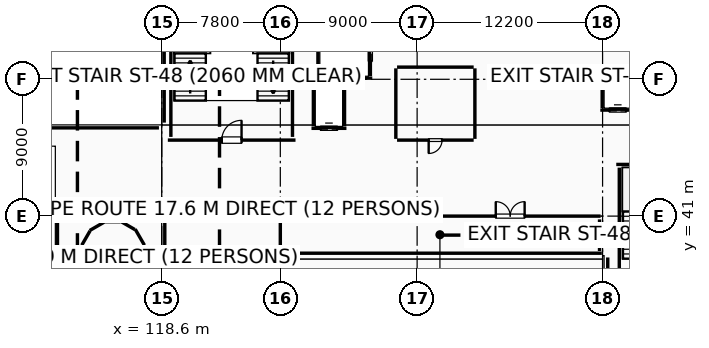
"""IFC4 building model, lengths in metres.
Left out: names, types, materials, properties, quantities, classifications, styles, units other than length and angle.
Written with IfcOpenShell. Run it as: python <this file> out.ifc"""

import sys

from ifc_helpers import new_model, si_unit, direction, frame, frame_2d, origin, origin_2d, place, context, subcontext, project, spatial, rectangle, i_section, extrude, element, fill, save


model = new_model("IFC4")
c1 = context("Model", 3, precision=1e-05, world=origin(), true_north=direction((0.0, 1.0)))
c2 = subcontext(c1, "Body", "Model", "MODEL_VIEW")
j1 = project(units=[si_unit("LENGTHUNIT", "METRE"), si_unit("PLANEANGLEUNIT", "RADIAN")], contexts=[c1])
p1 = place(None, origin())
s1 = spatial("IfcSite", under=j1, at=p1, CompositionType="ELEMENT")
p2 = place(p1, origin())
s2 = spatial("IfcBuilding", under=s1, at=p2, CompositionType="ELEMENT")
p3 = place(p2, frame((0.0, 0.0, 10.2)))
s3 = spatial("IfcBuildingStorey", under=s2, at=p3, CompositionType="ELEMENT", Elevation=10.2)
for number, where, z_axis, x_axis in (
    (1, (118.6, 50.0, 0.0), (0.0, 0.0, 1.0), (1.0, 0.0, 0.0)),
    (2, (126.4, 41.0, 0.0), (0.0, 0.0, 1.0), (1.0, 0.0, 0.0)),
    (3, (135.4, 41.0, 0.0), (0.0, 0.0, 1.0), (1.0, 0.0, 0.0)),
    (4, (135.4, 50.0, 0.0), (0.0, 0.0, 1.0), (1.0, 0.0, 0.0)),
):
    element("IfcColumn", number, at=place(p3, frame(where, z_axis=z_axis, x_axis=x_axis)), inside=s3, PredefinedType="COLUMN", context=c2, shape_type="SweptSolid", body=[
        extrude(rectangle(XDim=0.75, YDim=0.75, at=origin_2d()), origin(), (0.0, 0.0, 1.0), 4.8),
    ])
p4 = place(p3, frame((147.6, 41.0, 0.0), z_axis=(0.0, 0.0, 1.0), x_axis=(1.0, 0.0, 0.0)))
e5 = element("IfcColumn", 5, at=p4, inside=s3, PredefinedType="COLUMN", context=c2, shape_type="SweptSolid", body=[
    extrude(i_section(OverallWidth=0.25, OverallDepth=0.4, WebThickness=0.01, FlangeThickness=0.013, FilletRadius=0.014, at=origin_2d()), origin(), (0.0, 0.0, 1.0), 4.8),
])
for number, where, z_axis, x_axis in (
    (6, (121.72, 51.78, 0.0), (0.0, 0.0, 1.0), (1.0, 0.0, 0.0)),
    (7, (124.68, 51.78, 0.0), (0.0, 0.0, 1.0), (1.0, 0.0, 0.0)),
):
    element("IfcColumn", number, at=place(p3, frame(where, z_axis=z_axis, x_axis=x_axis)), inside=s3, PredefinedType="COLUMN", context=c2, shape_type="SweptSolid", body=[
        extrude(i_section(OverallWidth=0.25, OverallDepth=0.35, WebThickness=0.01, FlangeThickness=0.012, FilletRadius=0.012, at=origin_2d()), origin(), (0.0, 0.0, 1.0), 4.8),
    ])
p5 = place(p3, frame((112.6, 41.0, 0.0), z_axis=(0.0, 0.0, 1.0), x_axis=(1.0, 0.0, 0.0)))
e8 = element("IfcColumn", 8, at=p5, inside=s3, PredefinedType="COLUMN", context=c2, shape_type="SweptSolid", body=[
    extrude(rectangle(XDim=1.2, YDim=1.2, at=origin_2d()), origin(), (0.0, 0.0, 1.0), 4.8),
])
p6 = place(p3, frame((103.129, 46.805, 0.0), z_axis=(0.0, 0.0, 1.0), x_axis=(1.0, 0.0, 0.0)))
e9 = element("IfcWall", 9, at=p6, inside=s3, PredefinedType="STANDARD", context=c2, shape_type="SweptSolid", body=[
    extrude(rectangle(XDim=15.286, YDim=0.35, at=frame_2d((7.643, 0.0))), origin(), (0.0, 0.0, 1.0), 3.725),
])
p7 = place(p3, frame((118.76, 47.15, 0.0), z_axis=(0.0, 0.0, 1.0), x_axis=(0.0, 1.0, 0.0)))
e10 = element("IfcWall", 10, at=p7, inside=s3, PredefinedType="STANDARD", context=c2, shape_type="SweptSolid", body=[
    extrude(rectangle(XDim=2.467, YDim=0.28, at=frame_2d((1.233, 0.0))), origin(), (0.0, 0.0, 1.0), 4.54),
])
p8 = place(p3, frame((118.76, 50.383, 0.0), z_axis=(0.0, 0.0, 1.0), x_axis=(0.0, 1.0, 0.0)))
e11 = element("IfcWall", 11, at=p8, inside=s3, PredefinedType="STANDARD", context=c2, shape_type="SweptSolid", body=[
    extrude(rectangle(XDim=5.234, YDim=0.28, at=frame_2d((2.617, 0.0))), origin(), (0.0, 0.0, 1.0), 3.525),
])
p9 = place(p8, frame((1.717, 0.0, 0.95)))
e12 = element("IfcOpeningElement", 12, at=p9, cuts=e11, PredefinedType="OPENING", context=c2, shape_type="SweptSolid", body=[
    extrude(rectangle(XDim=1.8, YDim=2.1, at=frame_2d((0.9, 1.05))), frame((0.0, 0.15, 0.0), z_axis=(0.0, -1.0, 0.0), x_axis=(1.0, 0.0, 0.0)), (0.0, 0.0, 1.0), 0.3),
])
p10 = place(p3, frame((147.94, 24.12, 0.0), z_axis=(0.0, 0.0, 1.0), x_axis=(0.0, 1.0, 0.0)))
e13 = element("IfcWall", 13, at=p10, inside=s3, PredefinedType="PARAPET", context=c2, shape_type="SweptSolid", body=[
    extrude(rectangle(XDim=14.16, YDim=0.18, at=frame_2d((7.08, 0.0))), origin(), (0.0, 0.0, 1.0), 0.88),
])
p11 = place(p3, frame((147.55, 38.56, 0.0), z_axis=(0.0, 0.0, 1.0), x_axis=(-1.0, 0.0, 0.0)))
e14 = element("IfcWall", 14, at=p11, inside=s3, PredefinedType="STANDARD", context=c2, shape_type="SweptSolid", body=[
    extrude(rectangle(XDim=21.1, YDim=0.28, at=frame_2d((10.55, 0.0))), origin(), (0.0, 0.0, 1.0), 4.54),
])
p12 = place(p3, frame((126.15, 38.26, 0.0), z_axis=(0.0, 0.0, 1.0), x_axis=(0.0, -1.0, 0.0)))
e15 = element("IfcWall", 15, at=p12, inside=s3, PredefinedType="ELEMENTEDWALL", context=c2, shape_type="SweptSolid", body=[
    extrude(rectangle(XDim=5.877, YDim=0.26, at=frame_2d((2.938, 0.0))), origin(), (0.0, 0.0, 1.0), 3.775),
])
p13 = place(p3, frame((119.0, 46.0, 0.0), z_axis=(0.0, 0.0, 1.0), x_axis=(1.0, 0.0, 0.0)))
e16 = element("IfcWall", 16, at=p13, inside=s3, PredefinedType="SHEAR", context=c2, shape_type="SweptSolid", body=[
    extrude(rectangle(XDim=8.4, YDim=0.4, at=frame_2d((4.2, 0.0))), origin(), (0.0, 0.0, 1.0), 4.54),
])
p14 = place(p13, frame((3.55, 0.0, 0.0)))
e17 = element("IfcOpeningElement", 17, at=p14, cuts=e16, PredefinedType="OPENING", context=c2, shape_type="SweptSolid", body=[
    extrude(rectangle(XDim=1.3, YDim=2.15, at=frame_2d((0.65, 1.075))), frame((0.0, 0.21, 0.0), z_axis=(0.0, -1.0, 0.0), x_axis=(1.0, 0.0, 0.0)), (0.0, 0.0, 1.0), 0.42),
])
for number, where, z_axis, x_axis in (
    (18, (127.2, 46.21, 0.0), (0.0, 0.0, 1.0), (0.0, 1.0, 0.0)),
    (19, (119.2, 54.59, 0.0), (0.0, 0.0, 1.0), (0.0, -1.0, 0.0)),
):
    element("IfcWall", number, at=place(p3, frame(where, z_axis=z_axis, x_axis=x_axis)), inside=s3, PredefinedType="SHEAR", context=c2, shape_type="SweptSolid", body=[
        extrude(rectangle(XDim=8.38, YDim=0.4, at=frame_2d((4.19, 0.0))), origin(), (0.0, 0.0, 1.0), 4.54),
    ])
p15 = place(p3, frame((128.45, 46.775, 0.0), z_axis=(0.0, 0.0, 1.0), x_axis=(1.0, 0.0, 0.0)))
e20 = element("IfcWall", 20, at=p15, inside=s3, PredefinedType="STANDARD", context=c2, shape_type="SweptSolid", body=[
    extrude(rectangle(XDim=2.3, YDim=0.25, at=frame_2d((1.15, 0.0))), origin(), (0.0, 0.0, 1.0), 4.53),
])
p16 = place(p15, frame((0.6, 0.0, 0.0)))
e21 = element("IfcOpeningElement", 21, at=p16, cuts=e20, PredefinedType="OPENING", context=c2, shape_type="SweptSolid", body=[
    extrude(rectangle(XDim=1.1, YDim=2.15, at=frame_2d((0.55, 1.075))), frame((0.0, 0.135, 0.0), z_axis=(0.0, -1.0, 0.0), x_axis=(1.0, 0.0, 0.0)), (0.0, 0.0, 1.0), 0.27),
])
p17 = place(p3, frame((130.75, 49.625, 0.0), z_axis=(0.0, 0.0, 1.0), x_axis=(-1.0, 0.0, 0.0)))
e22 = element("IfcWall", 22, at=p17, inside=s3, PredefinedType="STANDARD", context=c2, shape_type="SweptSolid", body=[
    extrude(rectangle(XDim=2.3, YDim=0.25, at=frame_2d((1.15, 0.0))), origin(), (0.0, 0.0, 1.0), 4.53),
])
for number, where, z_axis, x_axis in (
    (23, (130.625, 46.91, 0.0), (0.0, 0.0, 1.0), (0.0, 1.0, 0.0)),
    (24, (128.575, 49.49, 0.0), (0.0, 0.0, 1.0), (0.0, -1.0, 0.0)),
):
    element("IfcWall", number, at=place(p3, frame(where, z_axis=z_axis, x_axis=x_axis)), inside=s3, PredefinedType="STANDARD", context=c2, shape_type="SweptSolid", body=[
        extrude(rectangle(XDim=2.58, YDim=0.25, at=frame_2d((1.29, 0.0))), origin(), (0.0, 0.0, 1.0), 4.53),
    ])
p18 = place(p3, frame((128.75, 50.075, 0.0), z_axis=(0.0, 0.0, 1.0), x_axis=(1.0, 0.0, 0.0)))
e25 = element("IfcWall", 25, at=p18, inside=s3, PredefinedType="STANDARD", context=c2, shape_type="SweptSolid", body=[
    extrude(rectangle(XDim=3.7, YDim=0.25, at=frame_2d((1.85, 0.0))), origin(), (0.0, 0.0, 1.0), 4.53),
])
p19 = place(p3, frame((132.325, 50.21, 0.0), z_axis=(0.0, 0.0, 1.0), x_axis=(0.0, 1.0, 0.0)))
e26 = element("IfcWall", 26, at=p19, inside=s3, PredefinedType="STANDARD", context=c2, shape_type="SweptSolid", body=[
    extrude(rectangle(XDim=4.38, YDim=0.25, at=frame_2d((2.19, 0.0))), origin(), (0.0, 0.0, 1.0), 4.53),
])
p20 = place(p19, frame((0.99, 0.0, 0.0)))
e27 = element("IfcOpeningElement", 27, at=p20, cuts=e26, PredefinedType="OPENING", context=c2, shape_type="SweptSolid", body=[
    extrude(rectangle(XDim=2.4, YDim=2.55, at=frame_2d((1.2, 1.275))), frame((0.0, 0.135, 0.0), z_axis=(0.0, -1.0, 0.0), x_axis=(1.0, 0.0, 0.0)), (0.0, 0.0, 1.0), 0.27),
])
p21 = place(p3, frame((128.875, 54.59, 0.0), z_axis=(0.0, 0.0, 1.0), x_axis=(0.0, -1.0, 0.0)))
e28 = element("IfcWall", 28, at=p21, inside=s3, PredefinedType="STANDARD", context=c2, shape_type="SweptSolid", body=[
    extrude(rectangle(XDim=4.38, YDim=0.25, at=frame_2d((2.19, 0.0))), origin(), (0.0, 0.0, 1.0), 4.53),
])
p22 = place(p3, frame((147.45, 47.975, 0.0), z_axis=(0.0, 0.0, 1.0), x_axis=(1.0, 0.0, 0.0)))
e29 = element("IfcWall", 29, at=p22, inside=s3, PredefinedType="STANDARD", context=c2, shape_type="SweptSolid", body=[
    extrude(rectangle(XDim=2.3, YDim=0.25, at=frame_2d((1.15, 0.0))), origin(), (0.0, 0.0, 1.0), 4.53),
])
p23 = place(p22, frame((0.6, 0.0, 0.0)))
e30 = element("IfcOpeningElement", 30, at=p23, cuts=e29, PredefinedType="OPENING", context=c2, shape_type="SweptSolid", body=[
    extrude(rectangle(XDim=1.1, YDim=2.15, at=frame_2d((0.55, 1.075))), frame((0.0, 0.135, 0.0), z_axis=(0.0, -1.0, 0.0), x_axis=(1.0, 0.0, 0.0)), (0.0, 0.0, 1.0), 0.27),
])
p24 = place(p3, frame((149.75, 50.825, 0.0), z_axis=(0.0, 0.0, 1.0), x_axis=(-1.0, 0.0, 0.0)))
e31 = element("IfcWall", 31, at=p24, inside=s3, PredefinedType="STANDARD", context=c2, shape_type="SweptSolid", body=[
    extrude(rectangle(XDim=2.3, YDim=0.25, at=frame_2d((1.15, 0.0))), origin(), (0.0, 0.0, 1.0), 4.53),
])
p25 = place(p3, frame((147.575, 50.69, 0.0), z_axis=(0.0, 0.0, 1.0), x_axis=(0.0, -1.0, 0.0)))
e32 = element("IfcWall", 32, at=p25, inside=s3, PredefinedType="STANDARD", context=c2, shape_type="SweptSolid", body=[
    extrude(rectangle(XDim=2.58, YDim=0.25, at=frame_2d((1.29, 0.0))), origin(), (0.0, 0.0, 1.0), 4.07),
])
p26 = place(p3, frame((156.9, 44.4, 0.0), z_axis=(0.0, 0.0, 1.0), x_axis=(-1.0, 0.0, 0.0)))
e33 = element("IfcWall", 33, at=p26, inside=s3, PredefinedType="SHEAR", context=c2, shape_type="SweptSolid", body=[
    extrude(rectangle(XDim=8.4, YDim=0.4, at=frame_2d((4.2, 0.0))), origin(), (0.0, 0.0, 1.0), 4.54),
])
p27 = place(p3, frame((148.7, 44.19, 0.0), z_axis=(0.0, 0.0, 1.0), x_axis=(0.0, -1.0, 0.0)))
e34 = element("IfcWall", 34, at=p27, inside=s3, PredefinedType="SHEAR", context=c2, shape_type="SweptSolid", body=[
    extrude(rectangle(XDim=8.38, YDim=0.4, at=frame_2d((4.19, 0.0))), origin(), (0.0, 0.0, 1.0), 4.54),
])
p28 = place(p3, frame((117.461, 39.086, 0.0), z_axis=(0.0, 0.0, 1.0), x_axis=(-0.500080723117, 0.865978793255, 0.0)))
e35 = element("IfcWall", 35, at=p28, inside=s3, PredefinedType="SHEAR", context=c2, shape_type="SweptSolid", body=[
    extrude(rectangle(XDim=1.219, YDim=0.35, at=frame_2d((0.609, 0.0))), origin(), (0.0, 0.0, 1.0), 4.54),
])
for number, where, z_axis, x_axis in (
    (36, (116.833, 40.115, 0.0), (0.0, 0.0, 1.0), (-0.866, 0.5, 0.0)),
    (37, (115.884, 40.628, 0.0), (0.0, 0.0, 1.0), (-1.0, 0.0, 0.0)),
    (38, (114.804, 40.598, 0.0), (0.0, 0.0, 1.0), (-0.866, -0.5, 0.0)),
    (39, (113.885, 40.033, 0.0), (0.0, 0.0, 1.0), (-0.5, -0.866, 0.0)),
    (40, (113.372, 39.083, 0.0), (0.0, 0.0, 1.0), (0.0, -1.0, 0.0)),
    (41, (113.402, 38.004, 0.0), (0.0, 0.0, 1.0), (0.5, -0.866, 0.0)),
    (42, (116.915, 37.167, 0.0), (0.0, 0.0, 1.0), (0.5, 0.866, 0.0)),
):
    element("IfcWall", number, at=place(p3, frame(where, z_axis=z_axis, x_axis=x_axis)), inside=s3, PredefinedType="SHEAR", context=c2, shape_type="SweptSolid", body=[
        extrude(rectangle(XDim=1.093, YDim=0.35, at=frame_2d((0.546, 0.0))), origin(), (0.0, 0.0, 1.0), 4.54),
    ])
p29 = place(p3, frame((117.428, 38.116, 0.0), z_axis=(0.0, 0.0, 1.0), x_axis=(0.0, 1.0, 0.0)))
e43 = element("IfcWall", 43, at=p29, inside=s3, PredefinedType="SHEAR", context=c2, shape_type="SweptSolid", body=[
    extrude(rectangle(XDim=0.967, YDim=0.35, at=frame_2d((0.483, 0.0))), origin(), (0.0, 0.0, 1.0), 4.54),
])
p30 = place(p3, frame((111.74, 23.345, 0.0), z_axis=(0.0, 0.0, 1.0), x_axis=(0.0, 1.0, 0.0)))
e44 = element("IfcWall", 44, at=p30, inside=s3, PredefinedType="PARTITIONING", context=c2, shape_type="SweptSolid", body=[
    extrude(rectangle(XDim=17.51, YDim=0.25, at=frame_2d((8.755, 0.0))), origin(), (0.0, 0.0, 1.0), 4.53),
])
p31 = place(p3, frame((118.945, 41.0, 0.0), z_axis=(0.0, 0.0, 1.0), x_axis=(1.0, 0.0, 0.0)))
e45 = element("IfcWall", 45, at=p31, inside=s3, PredefinedType="PARTITIONING", context=c2, shape_type="SweptSolid", body=[
    extrude(rectangle(XDim=7.076, YDim=0.25, at=frame_2d((3.538, 0.0))), origin(), (0.0, 0.0, 1.0), 4.22),
])
p32 = place(p31, frame((2.455, 0.0, 0.0)))
e46 = element("IfcOpeningElement", 46, at=p32, cuts=e45, PredefinedType="OPENING", context=c2, shape_type="SweptSolid", body=[
    extrude(rectangle(XDim=2.0, YDim=2.35, at=frame_2d((1.0, 1.175))), frame((0.0, 0.135, 0.0), z_axis=(0.0, -1.0, 0.0), x_axis=(1.0, 0.0, 0.0)), (0.0, 0.0, 1.0), 0.27),
])
p33 = place(p3, frame((118.8, 24.176, 0.0), z_axis=(0.0, 0.0, 1.0), x_axis=(0.0, 1.0, 0.0)))
e47 = element("IfcWall", 47, at=p33, inside=s3, PredefinedType="PARTITIONING", context=c2, shape_type="SweptSolid", body=[
    extrude(rectangle(XDim=16.679, YDim=0.25, at=frame_2d((8.339, 0.0))), origin(), (0.0, 0.0, 1.0), 3.72),
])
p34 = place(p3, frame((126.79, 41.0, 0.0), z_axis=(0.0, 0.0, 1.0), x_axis=(1.0, 0.0, 0.0)))
e48 = element("IfcWall", 48, at=p34, inside=s3, PredefinedType="PARTITIONING", context=c2, shape_type="SweptSolid", body=[
    extrude(rectangle(XDim=8.22, YDim=0.25, at=frame_2d((4.11, 0.0))), origin(), (0.0, 0.0, 1.0), 3.92),
])
p35 = place(p3, frame((135.79, 41.0, 0.0), z_axis=(0.0, 0.0, 1.0), x_axis=(1.0, 0.0, 0.0)))
e49 = element("IfcWall", 49, at=p35, inside=s3, PredefinedType="PARTITIONING", context=c2, shape_type="SweptSolid", body=[
    extrude(rectangle(XDim=11.681, YDim=0.25, at=frame_2d((5.84, 0.0))), origin(), (0.0, 0.0, 1.0), 3.97),
])
p36 = place(p35, frame((4.783, 0.0, 0.0)))
e50 = element("IfcOpeningElement", 50, at=p36, cuts=e49, PredefinedType="OPENING", context=c2, shape_type="SweptSolid", body=[
    extrude(rectangle(XDim=1.9, YDim=2.35, at=frame_2d((0.95, 1.175))), frame((0.0, 0.135, 0.0), z_axis=(0.0, -1.0, 0.0), x_axis=(1.0, 0.0, 0.0)), (0.0, 0.0, 1.0), 0.27),
])
p37 = place(p3, frame((147.4, 40.785, 0.0), z_axis=(0.0, 0.0, 1.0), x_axis=(0.0, -1.0, 0.0)))
e51 = element("IfcWall", 51, at=p37, inside=s3, PredefinedType="PARTITIONING", context=c2, shape_type="SweptSolid", body=[
    extrude(rectangle(XDim=2.081, YDim=0.25, at=frame_2d((1.041, 0.0))), origin(), (0.0, 0.0, 1.0), 4.02),
])
p38 = place(p3, frame((126.4, 38.745, 0.0), z_axis=(0.0, 0.0, 1.0), x_axis=(0.0, 1.0, 0.0)))
e52 = element("IfcWall", 52, at=p38, inside=s3, PredefinedType="PARTITIONING", context=c2, shape_type="SweptSolid", body=[
    extrude(rectangle(XDim=1.865, YDim=0.25, at=frame_2d((0.933, 0.0))), origin(), (0.0, 0.0, 1.0), 3.77),
])
p39 = place(p3, frame((134.08, 50.8, 0.0), z_axis=(0.0, 0.0, 1.0), x_axis=(1.0, 0.0, 0.0)))
e53 = element("IfcWall", 53, at=p39, inside=s3, PredefinedType="PARTITIONING", context=c2, shape_type="SweptSolid", body=[
    extrude(rectangle(XDim=5.04, YDim=0.12, at=frame_2d((2.52, 0.0))), origin(), (0.0, 0.0, 1.0), 4.53),
])
p40 = place(p3, frame((139.2, 50.72, 0.0), z_axis=(0.0, 0.0, 1.0), x_axis=(0.0, -1.0, 0.0)))
e54 = element("IfcWall", 54, at=p40, inside=s3, PredefinedType="PARTITIONING", context=c2, shape_type="SweptSolid", body=[
    extrude(rectangle(XDim=4.64, YDim=0.12, at=frame_2d((2.32, 0.0))), origin(), (0.0, 0.0, 1.0), 4.53),
])
p41 = place(p3, frame((139.12, 46.0, 0.0), z_axis=(0.0, 0.0, 1.0), x_axis=(-1.0, 0.0, 0.0)))
e55 = element("IfcWall", 55, at=p41, inside=s3, PredefinedType="PARTITIONING", context=c2, shape_type="SweptSolid", body=[
    extrude(rectangle(XDim=5.04, YDim=0.12, at=frame_2d((2.52, 0.0))), origin(), (0.0, 0.0, 1.0), 4.53),
])
p42 = place(p41, frame((2.08, 0.0, 0.0)))
e56 = element("IfcOpeningElement", 56, at=p42, cuts=e55, PredefinedType="OPENING", context=c2, shape_type="SweptSolid", body=[
    extrude(rectangle(XDim=0.88, YDim=2.1, at=frame_2d((0.44, 1.05))), frame((0.0, 0.07, 0.0), z_axis=(0.0, -1.0, 0.0), x_axis=(1.0, 0.0, 0.0)), (0.0, 0.0, 1.0), 0.14),
])
p43 = place(p3, frame((134.0, 46.08, 0.0), z_axis=(0.0, 0.0, 1.0), x_axis=(0.0, 1.0, 0.0)))
e57 = element("IfcWall", 57, at=p43, inside=s3, PredefinedType="PARTITIONING", context=c2, shape_type="SweptSolid", body=[
    extrude(rectangle(XDim=4.64, YDim=0.12, at=frame_2d((2.32, 0.0))), origin(), (0.0, 0.0, 1.0), 4.53),
])
p44 = place(p14, origin())
e58 = element("IfcDoor", 58, at=p44, inside=s3, OperationType="SINGLE_SWING_RIGHT", PredefinedType="DOOR", context=c2, shape_type="SweptSolid", body=[
    extrude(rectangle(XDim=1.3, YDim=2.15, at=frame_2d((0.65, 1.075))), frame((0.0, 0.025, 0.0), z_axis=(0.0, -1.0, 0.0), x_axis=(1.0, 0.0, 0.0)), (0.0, 0.0, 1.0), 0.05),
])
fill(e17, e58)
p45 = place(p16, origin())
e59 = element("IfcDoor", 59, at=p45, inside=s3, OperationType="DOUBLE_DOOR_SLIDING", PredefinedType="DOOR", context=c2, shape_type="SweptSolid", body=[
    extrude(rectangle(XDim=1.1, YDim=2.15, at=frame_2d((0.55, 1.075))), frame((0.0, 0.025, 0.0), z_axis=(0.0, -1.0, 0.0), x_axis=(1.0, 0.0, 0.0)), (0.0, 0.0, 1.0), 0.05),
])
fill(e21, e59)
p46 = place(p20, origin())
e60 = element("IfcDoor", 60, at=p46, inside=s3, OperationType="DOUBLE_DOOR_SLIDING", PredefinedType="DOOR", context=c2, shape_type="SweptSolid", body=[
    extrude(rectangle(XDim=2.4, YDim=2.55, at=frame_2d((1.2, 1.275))), frame((0.0, 0.025, 0.0), z_axis=(0.0, -1.0, 0.0), x_axis=(1.0, 0.0, 0.0)), (0.0, 0.0, 1.0), 0.05),
])
fill(e27, e60)
p47 = place(p23, origin())
e61 = element("IfcDoor", 61, at=p47, inside=s3, OperationType="DOUBLE_DOOR_SLIDING", PredefinedType="DOOR", context=c2, shape_type="SweptSolid", body=[
    extrude(rectangle(XDim=1.1, YDim=2.15, at=frame_2d((0.55, 1.075))), frame((0.0, 0.025, 0.0), z_axis=(0.0, -1.0, 0.0), x_axis=(1.0, 0.0, 0.0)), (0.0, 0.0, 1.0), 0.05),
])
fill(e30, e61)
p48 = place(p32, origin())
e62 = element("IfcDoor", 62, at=p48, inside=s3, OperationType="DOUBLE_SWING_LEFT", PredefinedType="DOOR", context=c2, shape_type="SweptSolid", body=[
    extrude(rectangle(XDim=2.0, YDim=2.35, at=frame_2d((1.0, 1.175))), frame((0.0, 0.025, 0.0), z_axis=(0.0, -1.0, 0.0), x_axis=(1.0, 0.0, 0.0)), (0.0, 0.0, 1.0), 0.05),
])
fill(e46, e62)
p49 = place(p36, origin())
e63 = element("IfcDoor", 63, at=p49, inside=s3, OperationType="DOUBLE_SWING_RIGHT", PredefinedType="DOOR", context=c2, shape_type="SweptSolid", body=[
    extrude(rectangle(XDim=1.9, YDim=2.35, at=frame_2d((0.95, 1.175))), frame((0.0, 0.025, 0.0), z_axis=(0.0, -1.0, 0.0), x_axis=(1.0, 0.0, 0.0)), (0.0, 0.0, 1.0), 0.05),
])
fill(e50, e63)
p50 = place(p42, origin())
e64 = element("IfcDoor", 64, at=p50, inside=s3, OperationType="SINGLE_SWING_RIGHT", PredefinedType="DOOR", context=c2, shape_type="SweptSolid", body=[
    extrude(rectangle(XDim=0.88, YDim=2.1, at=frame_2d((0.44, 1.05))), frame((0.0, 0.025, 0.0), z_axis=(0.0, -1.0, 0.0), x_axis=(1.0, 0.0, 0.0)), (0.0, 0.0, 1.0), 0.05),
])
fill(e56, e64)
save(model, sys.argv[1])
